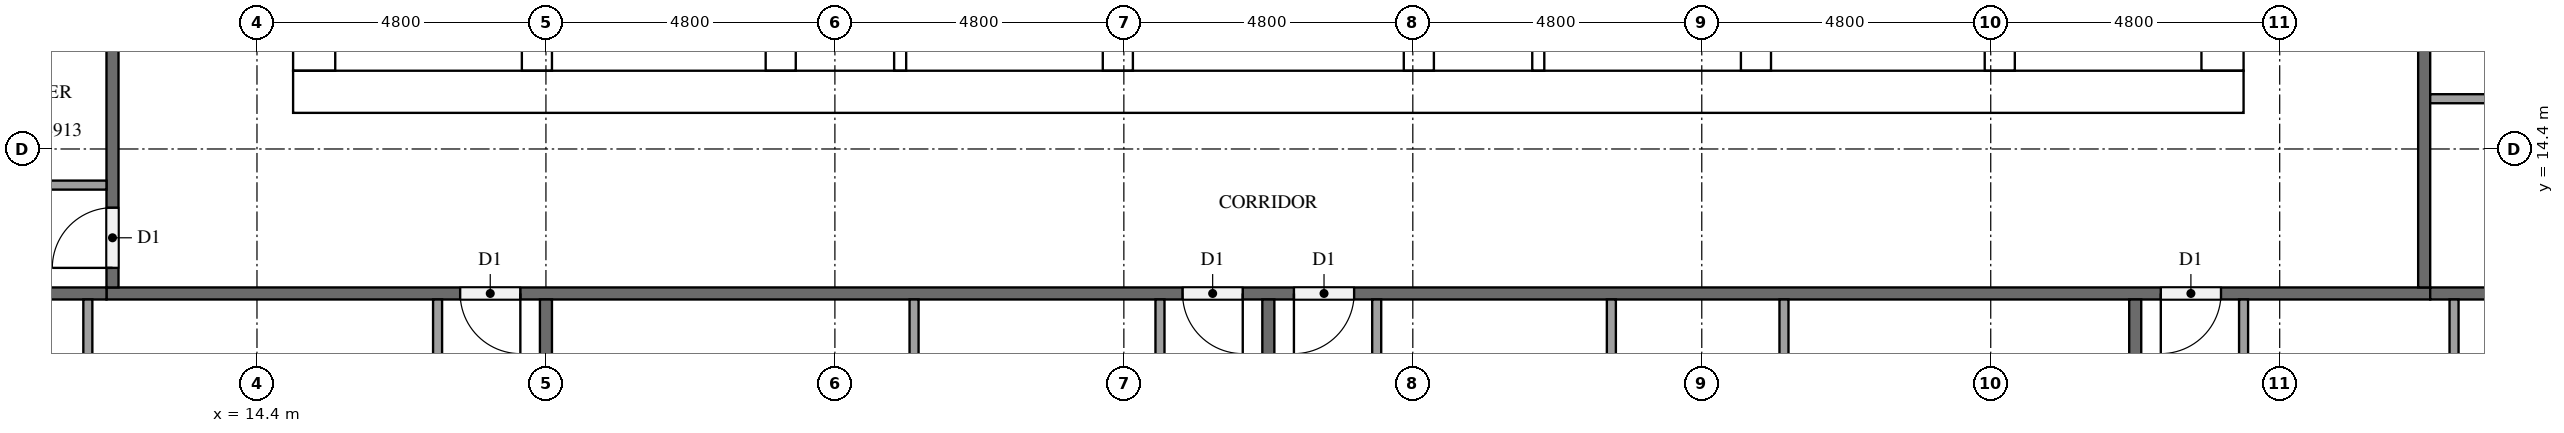
"""IFC4 building model, lengths in metres.
Left out: names, types, materials, properties, quantities, classifications, styles, units other than length and angle.
Written with IfcOpenShell. Run it as: python <this file> out.ifc"""

import sys

from ifc_helpers import new_model, si_unit, direction, frame, frame_2d, origin, place, context, subcontext, project, spatial, rectangle, extrude, element, fill, save


model = new_model("IFC4")
c1 = context("Model", 3, precision=1e-05, world=origin(), true_north=direction((0.0, 1.0)))
c2 = subcontext(c1, "Body", "Model", "MODEL_VIEW")
j1 = project(units=[si_unit("LENGTHUNIT", "METRE"), si_unit("PLANEANGLEUNIT", "RADIAN")], contexts=[c1])
p1 = place(None, origin())
s1 = spatial("IfcSite", under=j1, at=p1, CompositionType="ELEMENT")
p2 = place(p1, origin())
s2 = spatial("IfcBuilding", under=s1, at=p2, CompositionType="ELEMENT")
p3 = place(p2, frame((0.0, 0.0, 189.4)))
s3 = spatial("IfcBuildingStorey", under=s2, at=p3, CompositionType="ELEMENT", Elevation=189.4)
p4 = place(p3, frame((15.0, 15.35, 0.0), z_axis=(0.0, 0.0, 1.0), x_axis=(1.0, 0.0, 0.0)))
e1 = element("IfcWall", 1, at=p4, inside=s3, PredefinedType="SHEAR", context=c2, shape_type="SweptSolid", body=[
    extrude(rectangle(XDim=32.4, YDim=0.7, at=frame_2d((16.2, 0.0))), origin(), (0.0, 0.0, 1.0), 3.2),
])
p5 = place(p4, frame((15.3, 0.0, 0.0)))
e2 = element("IfcOpeningElement", 2, at=p5, cuts=e1, PredefinedType="OPENING", context=c2, shape_type="SweptSolid", body=[
    extrude(rectangle(XDim=1.8, YDim=2.1, at=frame_2d((0.9, 1.05))), frame((0.0, 0.36, 0.0), z_axis=(0.0, -1.0, 0.0), x_axis=(1.0, 0.0, 0.0)), (0.0, 0.0, 1.0), 0.72),
])
p6 = place(p3, frame((15.35, 15.7, 0.0), z_axis=(0.0, 0.0, 1.0), x_axis=(0.0, 1.0, 0.0)))
e3 = element("IfcWall", 3, at=p6, inside=s3, PredefinedType="SHEAR", context=c2, shape_type="SweptSolid", body=[
    extrude(rectangle(XDim=21.4, YDim=0.7, at=frame_2d((10.7, 0.0))), origin(), (0.0, 0.0, 1.0), 3.2),
])
p7 = place(p6, frame((5.06, 0.0, 0.0)))
e4 = element("IfcOpeningElement", 4, at=p7, cuts=e3, PredefinedType="OPENING", context=c2, shape_type="SweptSolid", body=[
    extrude(rectangle(XDim=1.2, YDim=2.1, at=frame_2d((0.6, 1.05))), frame((0.0, 0.36, 0.0), z_axis=(0.0, -1.0, 0.0), x_axis=(1.0, 0.0, 0.0)), (0.0, 0.0, 1.0), 0.72),
])
p8 = place(p3, frame((47.05, 15.7, 0.0), z_axis=(0.0, 0.0, 1.0), x_axis=(0.0, 1.0, 0.0)))
e5 = element("IfcWall", 5, at=p8, inside=s3, PredefinedType="SHEAR", context=c2, shape_type="SweptSolid", body=[
    extrude(rectangle(XDim=21.4, YDim=0.7, at=frame_2d((10.7, 0.0))), origin(), (0.0, 0.0, 1.0), 3.2),
])
p9 = place(p8, frame((10.4, 0.0, 0.0)))
e6 = element("IfcOpeningElement", 6, at=p9, cuts=e5, PredefinedType="OPENING", context=c2, shape_type="SweptSolid", body=[
    extrude(rectangle(XDim=1.2, YDim=2.1, at=frame_2d((0.6, 1.05))), frame((0.0, 0.36, 0.0), z_axis=(0.0, -1.0, 0.0), x_axis=(1.0, 0.0, 0.0)), (0.0, 0.0, 1.0), 0.72),
])
p10 = place(p3, frame((19.05, 15.7, 0.0), z_axis=(0.0, 0.0, 1.0), x_axis=(0.0, 1.0, 0.0)))
e7 = element("IfcWall", 7, at=p10, inside=s3, PredefinedType="SHEAR", context=c2, shape_type="SweptSolid", body=[
    extrude(rectangle(XDim=15.3, YDim=0.5, at=frame_2d((7.65, 0.0))), origin(), (0.0, 0.0, 1.0), 3.2),
])
p11 = place(p10, frame((9.75, 0.0, 0.0)))
e8 = element("IfcOpeningElement", 8, at=p11, cuts=e7, PredefinedType="OPENING", context=c2, shape_type="SweptSolid", body=[
    extrude(rectangle(XDim=1.1, YDim=2.1, at=frame_2d((0.55, 1.05))), frame((0.0, 0.26, 0.0), z_axis=(0.0, -1.0, 0.0), x_axis=(1.0, 0.0, 0.0)), (0.0, 0.0, 1.0), 0.52),
])
p12 = place(p10, frame((13.25, 0.0, 0.0)))
e9 = element("IfcOpeningElement", 9, at=p12, cuts=e7, PredefinedType="OPENING", context=c2, shape_type="SweptSolid", body=[
    extrude(rectangle(XDim=1.1, YDim=2.1, at=frame_2d((0.55, 1.05))), frame((0.0, 0.26, 0.0), z_axis=(0.0, -1.0, 0.0), x_axis=(1.0, 0.0, 0.0)), (0.0, 0.0, 1.0), 0.52),
])
p13 = place(p10, frame((0.5, 0.0, 0.0)))
e10 = element("IfcOpeningElement", 10, at=p13, cuts=e7, PredefinedType="OPENING", context=c2, shape_type="SweptSolid", body=[
    extrude(rectangle(XDim=1.2, YDim=2.1, at=frame_2d((0.6, 1.05))), frame((0.0, 0.26, 0.0), z_axis=(0.0, -1.0, 0.0), x_axis=(1.0, 0.0, 0.0)), (0.0, 0.0, 1.0), 0.52),
])
p14 = place(p3, frame((23.1, 15.7, 0.0), z_axis=(0.0, 0.0, 1.0), x_axis=(0.0, 1.0, 0.0)))
e11 = element("IfcWall", 11, at=p14, inside=s3, PredefinedType="SHEAR", context=c2, shape_type="SweptSolid", body=[
    extrude(rectangle(XDim=21.4, YDim=0.5, at=frame_2d((10.7, 0.0))), origin(), (0.0, 0.0, 1.0), 3.2),
])
p15 = place(p3, frame((39.3, 15.7, 0.0), z_axis=(0.0, 0.0, 1.0), x_axis=(0.0, 1.0, 0.0)))
e12 = element("IfcWall", 12, at=p15, inside=s3, PredefinedType="SHEAR", context=c2, shape_type="SweptSolid", body=[
    extrude(rectangle(XDim=8.55, YDim=0.5, at=frame_2d((4.275, 0.0))), origin(), (0.0, 0.0, 1.0), 3.2),
])
p16 = place(p3, frame((43.35, 15.7, 0.0), z_axis=(0.0, 0.0, 1.0), x_axis=(0.0, 1.0, 0.0)))
e13 = element("IfcWall", 13, at=p16, inside=s3, PredefinedType="SHEAR", context=c2, shape_type="SweptSolid", body=[
    extrude(rectangle(XDim=8.55, YDim=0.5, at=frame_2d((4.275, 0.0))), origin(), (0.0, 0.0, 1.0), 3.2),
])
p17 = place(p16, frame((0.5, 0.0, 0.0)))
e14 = element("IfcOpeningElement", 14, at=p17, cuts=e13, PredefinedType="OPENING", context=c2, shape_type="SweptSolid", body=[
    extrude(rectangle(XDim=1.2, YDim=2.1, at=frame_2d((0.6, 1.05))), frame((0.0, 0.26, 0.0), z_axis=(0.0, -1.0, 0.0), x_axis=(1.0, 0.0, 0.0)), (0.0, 0.0, 1.0), 0.52),
])
for number, where, z_axis, x_axis in (
    (15, (28.7, 15.7, 0.0), (0.0, 0.0, 1.0), (0.0, 1.0, 0.0)),
    (16, (33.7, 15.7, 0.0), (0.0, 0.0, 1.0), (0.0, 1.0, 0.0)),
):
    element("IfcWall", number, at=place(p3, frame(where, z_axis=z_axis, x_axis=x_axis)), inside=s3, PredefinedType="SHEAR", context=c2, shape_type="SweptSolid", body=[
        extrude(rectangle(XDim=2.8, YDim=0.5, at=frame_2d((1.4, 0.0))), origin(), (0.0, 0.0, 1.0), 3.2),
    ])
for number, where, z_axis, x_axis in (
    (17, (25.084, 15.7, 0.0), (0.0, 0.0, 1.0), (0.0, 1.0, 0.0)),
    (18, (35.684, 15.7, 0.0), (0.0, 0.0, 1.0), (0.0, 1.0, 0.0)),
):
    element("IfcWall", number, at=place(p3, frame(where, z_axis=z_axis, x_axis=x_axis)), inside=s3, PredefinedType="PARTITIONING", context=c2, shape_type="SweptSolid", body=[
        extrude(rectangle(XDim=2.8, YDim=0.2, at=frame_2d((1.4, 0.0))), origin(), (0.0, 0.0, 1.0), 3.2),
    ])
p18 = place(p3, frame((50.5, 12.0, 0.0), z_axis=(0.0, 0.0, 1.0), x_axis=(-1.0, 0.0, 0.0)))
e19 = element("IfcWall", 19, at=p18, inside=s3, PredefinedType="PARTITIONING", context=c2, shape_type="SweptSolid", body=[
    extrude(rectangle(XDim=38.6, YDim=0.2, at=frame_2d((19.3, 0.0))), origin(), (0.0, 0.0, 1.0), 3.2),
])
p19 = place(p18, frame((31.725, 0.0, 0.0)))
e20 = element("IfcOpeningElement", 20, at=p19, cuts=e19, PredefinedType="OPENING", context=c2, shape_type="SweptSolid", body=[
    extrude(rectangle(XDim=1.0, YDim=2.1, at=frame_2d((0.5, 1.05))), frame((0.0, 0.11, 0.0), z_axis=(0.0, -1.0, 0.0), x_axis=(1.0, 0.0, 0.0)), (0.0, 0.0, 1.0), 0.22),
])
p20 = place(p18, frame((19.725, 0.0, 0.0)))
e21 = element("IfcOpeningElement", 21, at=p20, cuts=e19, PredefinedType="OPENING", context=c2, shape_type="SweptSolid", body=[
    extrude(rectangle(XDim=1.0, YDim=2.1, at=frame_2d((0.5, 1.05))), frame((0.0, 0.11, 0.0), z_axis=(0.0, -1.0, 0.0), x_axis=(1.0, 0.0, 0.0)), (0.0, 0.0, 1.0), 0.22),
])
p21 = place(p18, frame((17.875, 0.0, 0.0)))
e22 = element("IfcOpeningElement", 22, at=p21, cuts=e19, PredefinedType="OPENING", context=c2, shape_type="SweptSolid", body=[
    extrude(rectangle(XDim=1.0, YDim=2.1, at=frame_2d((0.5, 1.05))), frame((0.0, 0.11, 0.0), z_axis=(0.0, -1.0, 0.0), x_axis=(1.0, 0.0, 0.0)), (0.0, 0.0, 1.0), 0.22),
])
p22 = place(p18, frame((3.475, 0.0, 0.0)))
e23 = element("IfcOpeningElement", 23, at=p22, cuts=e19, PredefinedType="OPENING", context=c2, shape_type="SweptSolid", body=[
    extrude(rectangle(XDim=1.0, YDim=2.1, at=frame_2d((0.5, 1.05))), frame((0.0, 0.11, 0.0), z_axis=(0.0, -1.0, 0.0), x_axis=(1.0, 0.0, 0.0)), (0.0, 0.0, 1.0), 0.22),
])
p23 = place(p3, frame((50.4, 40.7, 0.0), z_axis=(0.0, 0.0, 1.0), x_axis=(0.0, -1.0, 0.0)))
e24 = element("IfcWall", 24, at=p23, inside=s3, PredefinedType="PARTITIONING", context=c2, shape_type="SweptSolid", body=[
    extrude(rectangle(XDim=28.6, YDim=0.2, at=frame_2d((14.3, 0.0))), origin(), (0.0, 0.0, 1.0), 3.2),
])
p24 = place(p23, frame((21.925, 0.0, 0.0)))
e25 = element("IfcOpeningElement", 25, at=p24, cuts=e24, PredefinedType="OPENING", context=c2, shape_type="SweptSolid", body=[
    extrude(rectangle(XDim=1.0, YDim=2.1, at=frame_2d((0.5, 1.05))), frame((0.0, 0.11, 0.0), z_axis=(0.0, -1.0, 0.0), x_axis=(1.0, 0.0, 0.0)), (0.0, 0.0, 1.0), 0.22),
])
p25 = place(p23, frame((20.075, 0.0, 0.0)))
e26 = element("IfcOpeningElement", 26, at=p25, cuts=e24, PredefinedType="OPENING", context=c2, shape_type="SweptSolid", body=[
    extrude(rectangle(XDim=1.0, YDim=2.1, at=frame_2d((0.5, 1.05))), frame((0.0, 0.11, 0.0), z_axis=(0.0, -1.0, 0.0), x_axis=(1.0, 0.0, 0.0)), (0.0, 0.0, 1.0), 0.22),
])
p26 = place(p23, frame((0.325, 0.0, 0.0)))
e27 = element("IfcOpeningElement", 27, at=p26, cuts=e24, PredefinedType="OPENING", context=c2, shape_type="SweptSolid", body=[
    extrude(rectangle(XDim=1.0, YDim=2.1, at=frame_2d((0.5, 1.05))), frame((0.0, 0.11, 0.0), z_axis=(0.0, -1.0, 0.0), x_axis=(1.0, 0.0, 0.0)), (0.0, 0.0, 1.0), 0.22),
])
p27 = place(p3, frame((12.0, 12.1, 0.0), z_axis=(0.0, 0.0, 1.0), x_axis=(0.0, 1.0, 0.0)))
e28 = element("IfcWall", 28, at=p27, inside=s3, PredefinedType="PARTITIONING", context=c2, shape_type="SweptSolid", body=[
    extrude(rectangle(XDim=28.6, YDim=0.2, at=frame_2d((14.3, 0.0))), origin(), (0.0, 0.0, 1.0), 3.2),
])
p28 = place(p27, frame((27.275, 0.0, 0.0)))
e29 = element("IfcOpeningElement", 29, at=p28, cuts=e28, PredefinedType="OPENING", context=c2, shape_type="SweptSolid", body=[
    extrude(rectangle(XDim=1.0, YDim=2.1, at=frame_2d((0.5, 1.05))), frame((0.0, 0.11, 0.0), z_axis=(0.0, -1.0, 0.0), x_axis=(1.0, 0.0, 0.0)), (0.0, 0.0, 1.0), 0.22),
])
p29 = place(p27, frame((0.325, 0.0, 0.0)))
e30 = element("IfcOpeningElement", 30, at=p29, cuts=e28, PredefinedType="OPENING", context=c2, shape_type="SweptSolid", body=[
    extrude(rectangle(XDim=1.0, YDim=2.1, at=frame_2d((0.5, 1.05))), frame((0.0, 0.11, 0.0), z_axis=(0.0, -1.0, 0.0), x_axis=(1.0, 0.0, 0.0)), (0.0, 0.0, 1.0), 0.22),
])
p30 = place(p3, frame((19.2, 11.9, 0.0), z_axis=(0.0, 0.0, 1.0), x_axis=(0.0, -1.0, 0.0)))
e31 = element("IfcWall", 31, at=p30, inside=s3, PredefinedType="PARTITIONING", context=c2, shape_type="SweptSolid", body=[
    extrude(rectangle(XDim=11.575, YDim=0.2, at=frame_2d((5.788, 0.0))), origin(), (0.0, 0.0, 1.0), 3.2),
])
p31 = place(p3, frame((4.9, 12.0, 0.0), z_axis=(0.0, 0.0, 1.0), x_axis=(1.0, 0.0, 0.0)))
e32 = element("IfcWall", 32, at=p31, inside=s3, PredefinedType="PARTITIONING", context=c2, shape_type="SweptSolid", body=[
    extrude(rectangle(XDim=7.0, YDim=0.2, at=frame_2d((3.5, 0.0))), origin(), (0.0, 0.0, 1.0), 3.2),
])
for number, where, z_axis, x_axis in (
    (33, (31.2, 11.9, 0.0), (0.0, 0.0, 1.0), (0.0, -1.0, 0.0)),
    (34, (45.6, 11.9, 0.0), (0.0, 0.0, 1.0), (0.0, -1.0, 0.0)),
):
    element("IfcWall", number, at=place(p3, frame(where, z_axis=z_axis, x_axis=x_axis)), inside=s3, PredefinedType="PARTITIONING", context=c2, shape_type="SweptSolid", body=[
        extrude(rectangle(XDim=11.8, YDim=0.2, at=frame_2d((5.9, 0.0))), origin(), (0.0, 0.0, 1.0), 3.2),
    ])
p32 = place(p3, frame((50.5, 12.0, 0.0), z_axis=(0.0, 0.0, 1.0), x_axis=(1.0, 0.0, 0.0)))
e35 = element("IfcWall", 35, at=p32, inside=s3, PredefinedType="PARTITIONING", context=c2, shape_type="SweptSolid", body=[
    extrude(rectangle(XDim=11.8, YDim=0.2, at=frame_2d((5.9, 0.0))), origin(), (0.0, 0.0, 1.0), 3.2),
])
p33 = place(p3, frame((11.59, 11.9, 0.0), z_axis=(0.0, 0.0, 1.0), x_axis=(0.0, -1.0, 0.0)))
e36 = element("IfcWall", 36, at=p33, inside=s3, PredefinedType="PARTITIONING", context=c2, shape_type="SweptSolid", body=[
    extrude(rectangle(XDim=4.175, YDim=0.15, at=frame_2d((2.087, 0.0))), origin(), (0.0, 0.0, 1.0), 3.2),
])
p34 = place(p3, frame((17.4, 11.9, 0.0), z_axis=(0.0, 0.0, 1.0), x_axis=(0.0, -1.0, 0.0)))
e37 = element("IfcWall", 37, at=p34, inside=s3, PredefinedType="PARTITIONING", context=c2, shape_type="SweptSolid", body=[
    extrude(rectangle(XDim=4.325, YDim=0.15, at=frame_2d((2.163, 0.0))), origin(), (0.0, 0.0, 1.0), 3.2),
])
p35 = place(p3, frame((25.315, 11.9, 0.0), z_axis=(0.0, 0.0, 1.0), x_axis=(0.0, -1.0, 0.0)))
e38 = element("IfcWall", 38, at=p35, inside=s3, PredefinedType="PARTITIONING", context=c2, shape_type="SweptSolid", body=[
    extrude(rectangle(XDim=4.475, YDim=0.15, at=frame_2d((2.237, 0.0))), origin(), (0.0, 0.0, 1.0), 3.2),
])
p36 = place(p3, frame((29.4, 11.9, 0.0), z_axis=(0.0, 0.0, 1.0), x_axis=(0.0, -1.0, 0.0)))
e39 = element("IfcWall", 39, at=p36, inside=s3, PredefinedType="PARTITIONING", context=c2, shape_type="SweptSolid", body=[
    extrude(rectangle(XDim=4.625, YDim=0.15, at=frame_2d((2.312, 0.0))), origin(), (0.0, 0.0, 1.0), 3.2),
])
for number, where, z_axis, x_axis in (
    (40, (36.898, 11.9, 0.0), (0.0, 0.0, 1.0), (0.0, -1.0, 0.0)),
    (41, (39.765, 11.9, 0.0), (0.0, 0.0, 1.0), (0.0, -1.0, 0.0)),
):
    element("IfcWall", number, at=place(p3, frame(where, z_axis=z_axis, x_axis=x_axis)), inside=s3, PredefinedType="PARTITIONING", context=c2, shape_type="SweptSolid", body=[
        extrude(rectangle(XDim=3.575, YDim=0.15, at=frame_2d((1.788, 0.0))), origin(), (0.0, 0.0, 1.0), 3.2),
    ])
p37 = place(p3, frame((33.0, 11.9, 0.0), z_axis=(0.0, 0.0, 1.0), x_axis=(0.0, -1.0, 0.0)))
e42 = element("IfcWall", 42, at=p37, inside=s3, PredefinedType="PARTITIONING", context=c2, shape_type="SweptSolid", body=[
    extrude(rectangle(XDim=3.725, YDim=0.15, at=frame_2d((1.862, 0.0))), origin(), (0.0, 0.0, 1.0), 3.2),
])
p38 = place(p3, frame((50.896, 11.9, 0.0), z_axis=(0.0, 0.0, 1.0), x_axis=(0.0, -1.0, 0.0)))
e43 = element("IfcWall", 43, at=p38, inside=s3, PredefinedType="PARTITIONING", context=c2, shape_type="SweptSolid", body=[
    extrude(rectangle(XDim=4.175, YDim=0.15, at=frame_2d((2.087, 0.0))), origin(), (0.0, 0.0, 1.0), 3.2),
])
p39 = place(p3, frame((47.4, 11.9, 0.0), z_axis=(0.0, 0.0, 1.0), x_axis=(0.0, -1.0, 0.0)))
e44 = element("IfcWall", 44, at=p39, inside=s3, PredefinedType="PARTITIONING", context=c2, shape_type="SweptSolid", body=[
    extrude(rectangle(XDim=4.325, YDim=0.15, at=frame_2d((2.163, 0.0))), origin(), (0.0, 0.0, 1.0), 3.2),
])
p40 = place(p3, frame((50.5, 15.235, 0.0), z_axis=(0.0, 0.0, 1.0), x_axis=(1.0, 0.0, 0.0)))
e45 = element("IfcWall", 45, at=p40, inside=s3, PredefinedType="PARTITIONING", context=c2, shape_type="SweptSolid", body=[
    extrude(rectangle(XDim=3.875, YDim=0.15, at=frame_2d((1.938, 0.0))), origin(), (0.0, 0.0, 1.0), 3.2),
])
p41 = place(p3, frame((11.9, 13.8, 0.0), z_axis=(0.0, 0.0, 1.0), x_axis=(-1.0, 0.0, 0.0)))
e46 = element("IfcWall", 46, at=p41, inside=s3, PredefinedType="PARTITIONING", context=c2, shape_type="SweptSolid", body=[
    extrude(rectangle(XDim=2.525, YDim=0.15, at=frame_2d((1.262, 0.0))), origin(), (0.0, 0.0, 1.0), 3.2),
])
p42 = place(p5, frame((1.8, 0.0, 0.0), z_axis=(0.0, 0.0, 1.0), x_axis=(-1.0, 0.0, 0.0)))
e47 = element("IfcDoor", 47, at=p42, inside=s3, OperationType="DOUBLE_DOOR_SINGLE_SWING", PredefinedType="DOOR", context=c2, shape_type="SweptSolid", body=[
    extrude(rectangle(XDim=1.8, YDim=2.1, at=frame_2d((0.9, 1.05))), frame((0.0, 0.025, 0.0), z_axis=(0.0, -1.0, 0.0), x_axis=(1.0, 0.0, 0.0)), (0.0, 0.0, 1.0), 0.05),
])
fill(e2, e47)
p43 = place(p19, origin())
e48 = element("IfcDoor", 48, at=p43, inside=s3, OperationType="SINGLE_SWING_LEFT", PredefinedType="DOOR", context=c2, shape_type="SweptSolid", body=[
    extrude(rectangle(XDim=1.0, YDim=2.1, at=frame_2d((0.5, 1.05))), frame((0.0, 0.025, 0.0), z_axis=(0.0, -1.0, 0.0), x_axis=(1.0, 0.0, 0.0)), (0.0, 0.0, 1.0), 0.05),
])
fill(e20, e48)
p44 = place(p20, origin())
e49 = element("IfcDoor", 49, at=p44, inside=s3, OperationType="SINGLE_SWING_LEFT", PredefinedType="DOOR", context=c2, shape_type="SweptSolid", body=[
    extrude(rectangle(XDim=1.0, YDim=2.1, at=frame_2d((0.5, 1.05))), frame((0.0, 0.025, 0.0), z_axis=(0.0, -1.0, 0.0), x_axis=(1.0, 0.0, 0.0)), (0.0, 0.0, 1.0), 0.05),
])
fill(e21, e49)
p45 = place(p21, origin())
e50 = element("IfcDoor", 50, at=p45, inside=s3, OperationType="SINGLE_SWING_RIGHT", PredefinedType="DOOR", context=c2, shape_type="SweptSolid", body=[
    extrude(rectangle(XDim=1.0, YDim=2.1, at=frame_2d((0.5, 1.05))), frame((0.0, 0.025, 0.0), z_axis=(0.0, -1.0, 0.0), x_axis=(1.0, 0.0, 0.0)), (0.0, 0.0, 1.0), 0.05),
])
fill(e22, e50)
p46 = place(p22, origin())
e51 = element("IfcDoor", 51, at=p46, inside=s3, OperationType="SINGLE_SWING_RIGHT", PredefinedType="DOOR", context=c2, shape_type="SweptSolid", body=[
    extrude(rectangle(XDim=1.0, YDim=2.1, at=frame_2d((0.5, 1.05))), frame((0.0, 0.025, 0.0), z_axis=(0.0, -1.0, 0.0), x_axis=(1.0, 0.0, 0.0)), (0.0, 0.0, 1.0), 0.05),
])
fill(e23, e51)
p47 = place(p29, origin())
e52 = element("IfcDoor", 52, at=p47, inside=s3, OperationType="SINGLE_SWING_LEFT", PredefinedType="DOOR", context=c2, shape_type="SweptSolid", body=[
    extrude(rectangle(XDim=1.0, YDim=2.1, at=frame_2d((0.5, 1.05))), frame((0.0, 0.025, 0.0), z_axis=(0.0, -1.0, 0.0), x_axis=(1.0, 0.0, 0.0)), (0.0, 0.0, 1.0), 0.05),
])
fill(e30, e52)
save(model, sys.argv[1])
